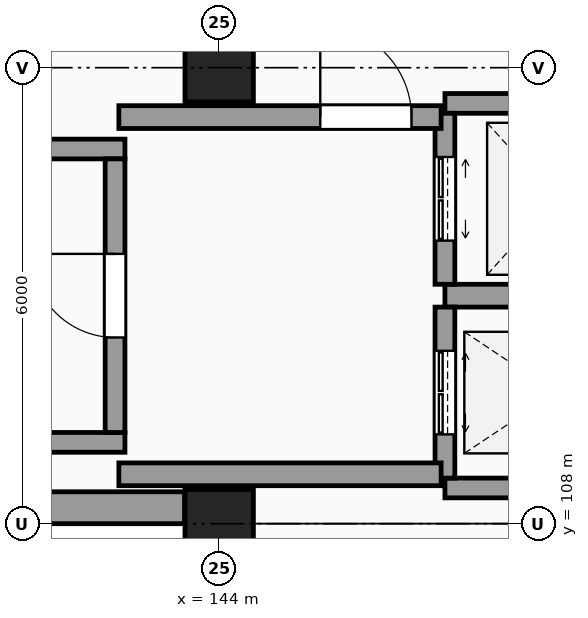
"""IFC4 building model, lengths in metres.
Left out: names, types, materials, properties, quantities, classifications, styles, units other than length and angle.
Written with IfcOpenShell. Run it as: python <this file> out.ifc"""

import sys

from ifc_helpers import new_model, si_unit, direction, frame, frame_2d, origin, origin_2d, place, context, subcontext, project, spatial, rectangle, extrude, element, fill, save


model = new_model("IFC4")
c1 = context("Model", 3, precision=1e-05, world=origin(), true_north=direction((0.0, 1.0)))
c2 = subcontext(c1, "Body", "Model", "MODEL_VIEW")
j1 = project(units=[si_unit("LENGTHUNIT", "METRE"), si_unit("PLANEANGLEUNIT", "RADIAN")], contexts=[c1])
p1 = place(None, origin())
s1 = spatial("IfcSite", under=j1, at=p1, CompositionType="ELEMENT")
p2 = place(p1, origin())
s2 = spatial("IfcBuilding", under=s1, at=p2, CompositionType="ELEMENT")
p3 = place(p2, frame((0.0, 0.0, -4.8)))
s3 = spatial("IfcBuildingStorey", under=s2, at=p3, CompositionType="ELEMENT", Elevation=-4.8)
for number, where, z_axis, x_axis in (
    (1, (144.0, 108.0, 0.0), (0.0, 0.0, 1.0), (1.0, 0.0, 0.0)),
    (2, (144.0, 114.0, 0.0), (0.0, 0.0, 1.0), (1.0, 0.0, 0.0)),
):
    element("IfcColumn", number, at=place(p3, frame(where, z_axis=z_axis, x_axis=x_axis)), inside=s3, PredefinedType="COLUMN", context=c2, shape_type="SweptSolid", body=[
        extrude(rectangle(XDim=0.9, YDim=0.9, at=origin_2d()), origin(), (0.0, 0.0, 1.0), 4.8),
    ])
p4 = place(p3, frame((138.455, 108.21, 0.0), z_axis=(0.0, 0.0, 1.0), x_axis=(1.0, 0.0, 0.0)))
e3 = element("IfcWall", 3, at=p4, inside=s3, PredefinedType="SOLIDWALL", context=c2, shape_type="SweptSolid", body=[
    extrude(rectangle(XDim=5.09, YDim=0.42, at=frame_2d((2.545, 0.0))), origin(), (0.0, 0.0, 1.0), 3.75),
])
for number, where, z_axis, x_axis in (
    (4, (132.04, 109.07, -0.5), (0.0, 0.0, 1.0), (1.0, 0.0, 0.0)),
    (5, (132.04, 112.93, -0.5), (0.0, 0.0, 1.0), (1.0, 0.0, 0.0)),
):
    element("IfcWall", number, at=place(p3, frame(where, z_axis=z_axis, x_axis=x_axis)), inside=s3, PredefinedType="SHEAR", context=c2, shape_type="SweptSolid", body=[
        extrude(rectangle(XDim=10.72, YDim=0.26, at=frame_2d((5.36, 0.0))), origin(), (0.0, 0.0, 1.0), 5.3),
    ])
p5 = place(p3, frame((142.63, 109.2, -0.5), z_axis=(0.0, 0.0, 1.0), x_axis=(0.0, 1.0, 0.0)))
e6 = element("IfcWall", 6, at=p5, inside=s3, PredefinedType="SHEAR", context=c2, shape_type="SweptSolid", body=[
    extrude(rectangle(XDim=3.6, YDim=0.26, at=frame_2d((1.8, 0.0))), origin(), (0.0, 0.0, 1.0), 5.3),
])
p6 = place(p5, frame((1.25, 0.0, 0.5)))
e7 = element("IfcOpeningElement", 7, at=p6, cuts=e6, PredefinedType="OPENING", context=c2, shape_type="SweptSolid", body=[
    extrude(rectangle(XDim=1.1, YDim=2.15, at=frame_2d((0.55, 1.075))), frame((0.0, 0.14, 0.0), z_axis=(0.0, -1.0, 0.0), x_axis=(1.0, 0.0, 0.0)), (0.0, 0.0, 1.0), 0.28),
])
p7 = place(p3, frame((146.97, 108.47, -0.5), z_axis=(0.0, 0.0, 1.0), x_axis=(1.0, 0.0, 0.0)))
e8 = element("IfcWall", 8, at=p7, inside=s3, PredefinedType="SHEAR", context=c2, shape_type="SweptSolid", body=[
    extrude(rectangle(XDim=2.91, YDim=0.26, at=frame_2d((1.455, 0.0))), origin(), (0.0, 0.0, 1.0), 5.3),
])
p8 = place(p3, frame((146.97, 111.0, -0.5), z_axis=(0.0, 0.0, 1.0), x_axis=(1.0, 0.0, 0.0)))
e9 = element("IfcWall", 9, at=p8, inside=s3, PredefinedType="SHEAR", context=c2, shape_type="SweptSolid", body=[
    extrude(rectangle(XDim=2.91, YDim=0.3, at=frame_2d((1.455, 0.0))), origin(), (0.0, 0.0, 1.0), 5.3),
])
p9 = place(p3, frame((146.97, 108.6, -0.5), z_axis=(0.0, 0.0, 1.0), x_axis=(0.0, 1.0, 0.0)))
e10 = element("IfcWall", 10, at=p9, inside=s3, PredefinedType="SHEAR", context=c2, shape_type="SweptSolid", body=[
    extrude(rectangle(XDim=2.25, YDim=0.26, at=frame_2d((1.125, 0.0))), origin(), (0.0, 0.0, 1.0), 5.3),
])
p10 = place(p9, frame((0.575, 0.0, 0.5)))
e11 = element("IfcOpeningElement", 11, at=p10, cuts=e10, PredefinedType="OPENING", context=c2, shape_type="SweptSolid", body=[
    extrude(rectangle(XDim=1.1, YDim=2.2, at=frame_2d((0.55, 1.1))), frame((0.0, 0.14, 0.0), z_axis=(0.0, -1.0, 0.0), x_axis=(1.0, 0.0, 0.0)), (0.0, 0.0, 1.0), 0.28),
])
p11 = place(p3, frame((146.97, 113.53, -0.5), z_axis=(0.0, 0.0, 1.0), x_axis=(1.0, 0.0, 0.0)))
e12 = element("IfcWall", 12, at=p11, inside=s3, PredefinedType="SHEAR", context=c2, shape_type="SweptSolid", body=[
    extrude(rectangle(XDim=2.91, YDim=0.26, at=frame_2d((1.455, 0.0))), origin(), (0.0, 0.0, 1.0), 5.3),
])
p12 = place(p3, frame((146.97, 111.15, -0.5), z_axis=(0.0, 0.0, 1.0), x_axis=(0.0, 1.0, 0.0)))
e13 = element("IfcWall", 13, at=p12, inside=s3, PredefinedType="SHEAR", context=c2, shape_type="SweptSolid", body=[
    extrude(rectangle(XDim=2.25, YDim=0.26, at=frame_2d((1.125, 0.0))), origin(), (0.0, 0.0, 1.0), 5.3),
])
p13 = place(p12, frame((0.575, 0.0, 0.5)))
e14 = element("IfcOpeningElement", 14, at=p13, cuts=e13, PredefinedType="OPENING", context=c2, shape_type="SweptSolid", body=[
    extrude(rectangle(XDim=1.1, YDim=2.2, at=frame_2d((0.55, 1.1))), frame((0.0, 0.14, 0.0), z_axis=(0.0, -1.0, 0.0), x_axis=(1.0, 0.0, 0.0)), (0.0, 0.0, 1.0), 0.28),
])
p14 = place(p3, frame((142.68, 113.35, -0.5), z_axis=(0.0, 0.0, 1.0), x_axis=(1.0, 0.0, 0.0)))
e15 = element("IfcWall", 15, at=p14, inside=s3, PredefinedType="SHEAR", context=c2, shape_type="SweptSolid", body=[
    extrude(rectangle(XDim=4.24, YDim=0.3, at=frame_2d((2.12, 0.0))), origin(), (0.0, 0.0, 1.0), 5.3),
])
p15 = place(p14, frame((2.65, 0.0, 0.5)))
e16 = element("IfcOpeningElement", 16, at=p15, cuts=e15, PredefinedType="OPENING", context=c2, shape_type="SweptSolid", body=[
    extrude(rectangle(XDim=1.2, YDim=2.2, at=frame_2d((0.6, 1.1))), frame((0.0, 0.16, 0.0), z_axis=(0.0, -1.0, 0.0), x_axis=(1.0, 0.0, 0.0)), (0.0, 0.0, 1.0), 0.32),
])
p16 = place(p3, frame((142.68, 108.65, -0.5), z_axis=(0.0, 0.0, 1.0), x_axis=(1.0, 0.0, 0.0)))
e17 = element("IfcWall", 17, at=p16, inside=s3, PredefinedType="SHEAR", context=c2, shape_type="SweptSolid", body=[
    extrude(rectangle(XDim=4.24, YDim=0.3, at=frame_2d((2.12, 0.0))), origin(), (0.0, 0.0, 1.0), 5.3),
])
p17 = place(p6, origin())
e18 = element("IfcDoor", 18, at=p17, inside=s3, OperationType="SINGLE_SWING_RIGHT", PredefinedType="DOOR", context=c2, shape_type="SweptSolid", body=[
    extrude(rectangle(XDim=1.1, YDim=2.15, at=frame_2d((0.55, 1.075))), frame((0.0, 0.025, 0.0), z_axis=(0.0, -1.0, 0.0), x_axis=(1.0, 0.0, 0.0)), (0.0, 0.0, 1.0), 0.05),
])
fill(e7, e18)
p18 = place(p10, origin())
e19 = element("IfcDoor", 19, at=p18, inside=s3, OperationType="DOUBLE_DOOR_SLIDING", PredefinedType="DOOR", context=c2, shape_type="SweptSolid", body=[
    extrude(rectangle(XDim=1.1, YDim=2.2, at=frame_2d((0.55, 1.1))), frame((0.0, 0.025, 0.0), z_axis=(0.0, -1.0, 0.0), x_axis=(1.0, 0.0, 0.0)), (0.0, 0.0, 1.0), 0.05),
])
fill(e11, e19)
p19 = place(p13, origin())
e20 = element("IfcDoor", 20, at=p19, inside=s3, OperationType="DOUBLE_DOOR_SLIDING", PredefinedType="DOOR", context=c2, shape_type="SweptSolid", body=[
    extrude(rectangle(XDim=1.1, YDim=2.2, at=frame_2d((0.55, 1.1))), frame((0.0, 0.025, 0.0), z_axis=(0.0, -1.0, 0.0), x_axis=(1.0, 0.0, 0.0)), (0.0, 0.0, 1.0), 0.05),
])
fill(e14, e20)
p20 = place(p15, origin())
e21 = element("IfcDoor", 21, at=p20, inside=s3, OperationType="SINGLE_SWING_LEFT", PredefinedType="DOOR", context=c2, shape_type="SweptSolid", body=[
    extrude(rectangle(XDim=1.2, YDim=2.2, at=frame_2d((0.6, 1.1))), frame((0.0, 0.025, 0.0), z_axis=(0.0, -1.0, 0.0), x_axis=(1.0, 0.0, 0.0)), (0.0, 0.0, 1.0), 0.05),
])
fill(e16, e21)
save(model, sys.argv[1])
